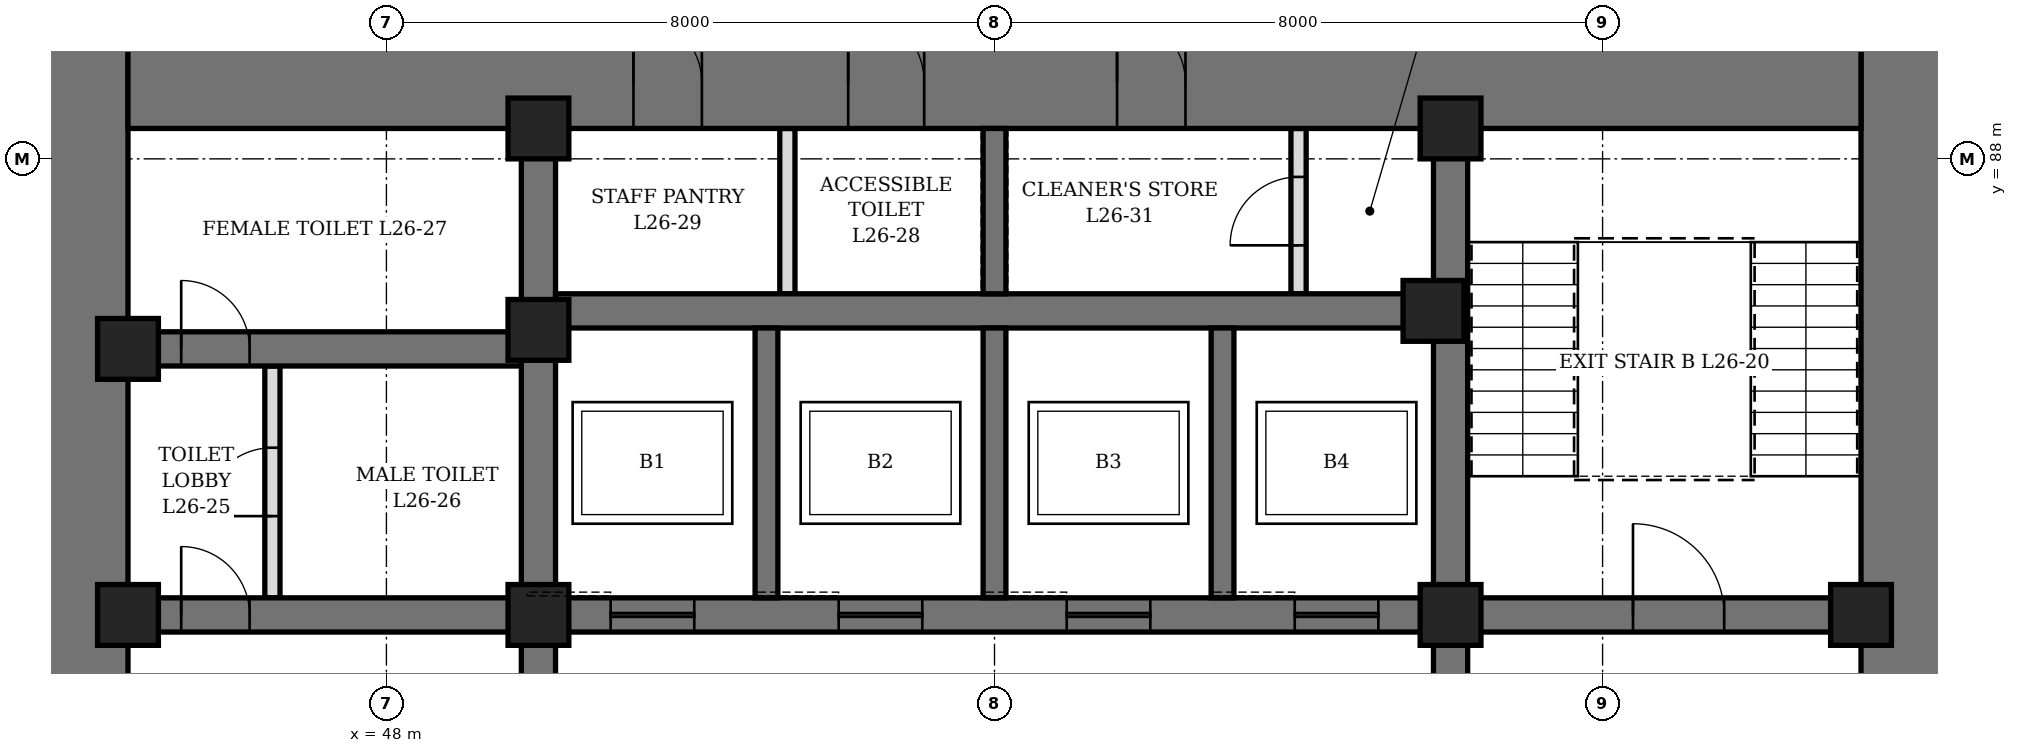
"""IFC4 building model, lengths in metres.
Left out: names, types, materials, properties, quantities, classifications, styles, units other than length and angle.
Written with IfcOpenShell. Run it as: python <this file> out.ifc"""

import sys

from ifc_helpers import new_model, si_unit, direction, frame, frame_2d, origin, origin_2d, place, context, subcontext, project, spatial, rectangle, hollow_rectangle, extrude, element, fill, save


model = new_model("IFC4")
c1 = context("Model", 3, precision=1e-05, world=origin(), true_north=direction((0.0, 1.0)))
c2 = subcontext(c1, "Body", "Model", "MODEL_VIEW")
j1 = project(units=[si_unit("LENGTHUNIT", "METRE"), si_unit("PLANEANGLEUNIT", "RADIAN")], contexts=[c1])
p1 = place(None, origin())
s1 = spatial("IfcSite", under=j1, at=p1, CompositionType="ELEMENT")
p2 = place(p1, origin())
s2 = spatial("IfcBuilding", under=s1, at=p2, CompositionType="ELEMENT")
p3 = place(p2, frame((0.0, 0.0, 120.7)))
s3 = spatial("IfcBuildingStorey", under=s2, at=p3, CompositionType="ELEMENT", Elevation=120.7)
p4 = place(p3, frame((44.0, 70.4, 0.0), z_axis=(0.0, 0.0, 1.0), x_axis=(0.0, 1.0, 0.0)))
e1 = element("IfcWall", 1, at=p4, inside=s3, PredefinedType="SHEAR", context=c2, shape_type="SweptSolid", body=[
    extrude(rectangle(XDim=19.2, YDim=1.2, at=frame_2d((9.6, 0.0))), origin(), (0.0, 0.0, 1.0), 4.2),
])
p5 = place(p4, frame((8.6, 0.0, 0.0)))
e2 = element("IfcOpeningElement", 2, at=p5, cuts=e1, PredefinedType="OPENING", context=c2, shape_type="SweptSolid", body=[
    extrude(rectangle(XDim=2.0, YDim=2.4, at=frame_2d((1.0, 1.2))), frame((0.0, 0.61, 0.0), z_axis=(0.0, -1.0, 0.0), x_axis=(1.0, 0.0, 0.0)), (0.0, 0.0, 1.0), 1.22),
])
p6 = place(p3, frame((68.0, 70.4, 0.0), z_axis=(0.0, 0.0, 1.0), x_axis=(0.0, 1.0, 0.0)))
e3 = element("IfcWall", 3, at=p6, inside=s3, PredefinedType="SHEAR", context=c2, shape_type="SweptSolid", body=[
    extrude(rectangle(XDim=19.2, YDim=1.2, at=frame_2d((9.6, 0.0))), origin(), (0.0, 0.0, 1.0), 4.2),
])
p7 = place(p6, frame((8.6, 0.0, 0.0)))
e4 = element("IfcOpeningElement", 4, at=p7, cuts=e3, PredefinedType="OPENING", context=c2, shape_type="SweptSolid", body=[
    extrude(rectangle(XDim=2.0, YDim=2.4, at=frame_2d((1.0, 1.2))), frame((0.0, 0.61, 0.0), z_axis=(0.0, -1.0, 0.0), x_axis=(1.0, 0.0, 0.0)), (0.0, 0.0, 1.0), 1.22),
])
p8 = place(p3, frame((44.6, 89.0, 0.0), z_axis=(0.0, 0.0, 1.0), x_axis=(1.0, 0.0, 0.0)))
e5 = element("IfcWall", 5, at=p8, inside=s3, PredefinedType="SHEAR", context=c2, shape_type="SweptSolid", body=[
    extrude(rectangle(XDim=22.8, YDim=1.2, at=frame_2d((11.4, 0.0))), origin(), (0.0, 0.0, 1.0), 4.2),
])
p9 = place(p8, frame((9.475, 0.0, 0.0)))
e6 = element("IfcOpeningElement", 6, at=p9, cuts=e5, PredefinedType="OPENING", context=c2, shape_type="SweptSolid", body=[
    extrude(rectangle(XDim=1.0, YDim=2.1, at=frame_2d((0.5, 1.05))), frame((0.0, 0.61, 0.0), z_axis=(0.0, -1.0, 0.0), x_axis=(1.0, 0.0, 0.0)), (0.0, 0.0, 1.0), 1.22),
])
p10 = place(p8, frame((6.65, 0.0, 0.0)))
e7 = element("IfcOpeningElement", 7, at=p10, cuts=e5, PredefinedType="OPENING", context=c2, shape_type="SweptSolid", body=[
    extrude(rectangle(XDim=0.9, YDim=2.1, at=frame_2d((0.45, 1.05))), frame((0.0, 0.61, 0.0), z_axis=(0.0, -1.0, 0.0), x_axis=(1.0, 0.0, 0.0)), (0.0, 0.0, 1.0), 1.22),
])
p11 = place(p8, frame((13.012, 0.0, 0.0)))
e8 = element("IfcOpeningElement", 8, at=p11, cuts=e5, PredefinedType="OPENING", context=c2, shape_type="SweptSolid", body=[
    extrude(rectangle(XDim=0.9, YDim=2.1, at=frame_2d((0.45, 1.05))), frame((0.0, 0.61, 0.0), z_axis=(0.0, -1.0, 0.0), x_axis=(1.0, 0.0, 0.0)), (0.0, 0.0, 1.0), 1.22),
])
p12 = place(p3, frame((50.0, 71.6, 0.0), z_axis=(0.0, 0.0, 1.0), x_axis=(0.0, 1.0, 0.0)))
e9 = element("IfcWall", 9, at=p12, inside=s3, PredefinedType="SHEAR", context=c2, shape_type="SweptSolid", body=[
    extrude(rectangle(XDim=16.8, YDim=0.45, at=frame_2d((8.4, 0.0))), origin(), (0.0, 0.0, 1.0), 4.2),
])
p13 = place(p12, frame((7.5, 0.0, 0.0)))
e10 = element("IfcOpeningElement", 10, at=p13, cuts=e9, PredefinedType="OPENING", context=c2, shape_type="SweptSolid", body=[
    extrude(rectangle(XDim=1.8, YDim=2.4, at=frame_2d((0.9, 1.2))), frame((0.0, 0.235, 0.0), z_axis=(0.0, -1.0, 0.0), x_axis=(1.0, 0.0, 0.0)), (0.0, 0.0, 1.0), 0.47),
])
p14 = place(p3, frame((62.0, 71.6, 0.0), z_axis=(0.0, 0.0, 1.0), x_axis=(0.0, 1.0, 0.0)))
e11 = element("IfcWall", 11, at=p14, inside=s3, PredefinedType="SHEAR", context=c2, shape_type="SweptSolid", body=[
    extrude(rectangle(XDim=16.8, YDim=0.45, at=frame_2d((8.4, 0.0))), origin(), (0.0, 0.0, 1.0), 4.2),
])
p15 = place(p14, frame((7.5, 0.0, 0.0)))
e12 = element("IfcOpeningElement", 12, at=p15, cuts=e11, PredefinedType="OPENING", context=c2, shape_type="SweptSolid", body=[
    extrude(rectangle(XDim=1.8, YDim=2.4, at=frame_2d((0.9, 1.2))), frame((0.0, 0.235, 0.0), z_axis=(0.0, -1.0, 0.0), x_axis=(1.0, 0.0, 0.0)), (0.0, 0.0, 1.0), 0.47),
])
p16 = place(p3, frame((44.6, 82.0, 0.0), z_axis=(0.0, 0.0, 1.0), x_axis=(1.0, 0.0, 0.0)))
e13 = element("IfcWall", 13, at=p16, inside=s3, PredefinedType="SHEAR", context=c2, shape_type="SweptSolid", body=[
    extrude(rectangle(XDim=5.175, YDim=0.45, at=frame_2d((2.587, 0.0))), origin(), (0.0, 0.0, 1.0), 4.2),
])
p17 = place(p16, frame((0.7, 0.0, 0.0)))
e14 = element("IfcOpeningElement", 14, at=p17, cuts=e13, PredefinedType="OPENING", context=c2, shape_type="SweptSolid", body=[
    extrude(rectangle(XDim=0.9, YDim=2.1, at=frame_2d((0.45, 1.05))), frame((0.0, 0.235, 0.0), z_axis=(0.0, -1.0, 0.0), x_axis=(1.0, 0.0, 0.0)), (0.0, 0.0, 1.0), 0.47),
])
p18 = place(p3, frame((44.6, 85.5, 0.0), z_axis=(0.0, 0.0, 1.0), x_axis=(1.0, 0.0, 0.0)))
e15 = element("IfcWall", 15, at=p18, inside=s3, PredefinedType="SHEAR", context=c2, shape_type="SweptSolid", body=[
    extrude(rectangle(XDim=5.175, YDim=0.45, at=frame_2d((2.587, 0.0))), origin(), (0.0, 0.0, 1.0), 4.2),
])
p19 = place(p18, frame((0.7, 0.0, 0.0)))
e16 = element("IfcOpeningElement", 16, at=p19, cuts=e15, PredefinedType="OPENING", context=c2, shape_type="SweptSolid", body=[
    extrude(rectangle(XDim=0.9, YDim=2.1, at=frame_2d((0.45, 1.05))), frame((0.0, 0.235, 0.0), z_axis=(0.0, -1.0, 0.0), x_axis=(1.0, 0.0, 0.0)), (0.0, 0.0, 1.0), 0.47),
])
p20 = place(p3, frame((62.225, 82.0, 0.0), z_axis=(0.0, 0.0, 1.0), x_axis=(1.0, 0.0, 0.0)))
e17 = element("IfcWall", 17, at=p20, inside=s3, PredefinedType="SHEAR", context=c2, shape_type="SweptSolid", body=[
    extrude(rectangle(XDim=5.175, YDim=0.45, at=frame_2d((2.587, 0.0))), origin(), (0.0, 0.0, 1.0), 4.2),
])
p21 = place(p20, frame((2.175, 0.0, 0.0)))
e18 = element("IfcOpeningElement", 18, at=p21, cuts=e17, PredefinedType="OPENING", context=c2, shape_type="SweptSolid", body=[
    extrude(rectangle(XDim=1.2, YDim=2.1, at=frame_2d((0.6, 1.05))), frame((0.0, 0.235, 0.0), z_axis=(0.0, -1.0, 0.0), x_axis=(1.0, 0.0, 0.0)), (0.0, 0.0, 1.0), 0.47),
])
p22 = place(p3, frame((50.225, 82.0, 0.0), z_axis=(0.0, 0.0, 1.0), x_axis=(1.0, 0.0, 0.0)))
e19 = element("IfcWall", 19, at=p22, inside=s3, PredefinedType="SHEAR", context=c2, shape_type="SweptSolid", body=[
    extrude(rectangle(XDim=11.55, YDim=0.45, at=frame_2d((5.775, 0.0))), origin(), (0.0, 0.0, 1.0), 4.2),
])
p23 = place(p22, frame((0.725, 0.0, 0.0)))
e20 = element("IfcOpeningElement", 20, at=p23, cuts=e19, PredefinedType="OPENING", context=c2, shape_type="SweptSolid", body=[
    extrude(rectangle(XDim=1.1, YDim=2.2, at=frame_2d((0.55, 1.1))), frame((0.0, 0.235, 0.0), z_axis=(0.0, -1.0, 0.0), x_axis=(1.0, 0.0, 0.0)), (0.0, 0.0, 1.0), 0.47),
])
p24 = place(p22, frame((3.725, 0.0, 0.0)))
e21 = element("IfcOpeningElement", 21, at=p24, cuts=e19, PredefinedType="OPENING", context=c2, shape_type="SweptSolid", body=[
    extrude(rectangle(XDim=1.1, YDim=2.2, at=frame_2d((0.55, 1.1))), frame((0.0, 0.235, 0.0), z_axis=(0.0, -1.0, 0.0), x_axis=(1.0, 0.0, 0.0)), (0.0, 0.0, 1.0), 0.47),
])
p25 = place(p22, frame((6.725, 0.0, 0.0)))
e22 = element("IfcOpeningElement", 22, at=p25, cuts=e19, PredefinedType="OPENING", context=c2, shape_type="SweptSolid", body=[
    extrude(rectangle(XDim=1.1, YDim=2.2, at=frame_2d((0.55, 1.1))), frame((0.0, 0.235, 0.0), z_axis=(0.0, -1.0, 0.0), x_axis=(1.0, 0.0, 0.0)), (0.0, 0.0, 1.0), 0.47),
])
p26 = place(p22, frame((9.725, 0.0, 0.0)))
e23 = element("IfcOpeningElement", 23, at=p26, cuts=e19, PredefinedType="OPENING", context=c2, shape_type="SweptSolid", body=[
    extrude(rectangle(XDim=1.1, YDim=2.2, at=frame_2d((0.55, 1.1))), frame((0.0, 0.235, 0.0), z_axis=(0.0, -1.0, 0.0), x_axis=(1.0, 0.0, 0.0)), (0.0, 0.0, 1.0), 0.47),
])
p27 = place(p3, frame((50.225, 86.0, 0.0), z_axis=(0.0, 0.0, 1.0), x_axis=(1.0, 0.0, 0.0)))
e24 = element("IfcWall", 24, at=p27, inside=s3, PredefinedType="SHEAR", context=c2, shape_type="SweptSolid", body=[
    extrude(rectangle(XDim=11.55, YDim=0.45, at=frame_2d((5.775, 0.0))), origin(), (0.0, 0.0, 1.0), 4.2),
])
for number, where, z_axis, x_axis in (
    (25, (53.0, 82.225, 0.0), (0.0, 0.0, 1.0), (0.0, 1.0, 0.0)),
    (26, (56.0, 82.225, 0.0), (0.0, 0.0, 1.0), (0.0, 1.0, 0.0)),
    (27, (59.0, 82.225, 0.0), (0.0, 0.0, 1.0), (0.0, 1.0, 0.0)),
):
    element("IfcWall", number, at=place(p3, frame(where, z_axis=z_axis, x_axis=x_axis)), inside=s3, PredefinedType="SHEAR", context=c2, shape_type="SweptSolid", body=[
        extrude(rectangle(XDim=3.55, YDim=0.3, at=frame_2d((1.775, 0.0))), origin(), (0.0, 0.0, 1.0), 4.2),
    ])
p28 = place(p3, frame((56.0, 86.225, 0.0), z_axis=(0.0, 0.0, 1.0), x_axis=(0.0, 1.0, 0.0)))
e28 = element("IfcWall", 28, at=p28, inside=s3, PredefinedType="SHEAR", context=c2, shape_type="SweptSolid", body=[
    extrude(rectangle(XDim=2.175, YDim=0.3, at=frame_2d((1.087, 0.0))), origin(), (0.0, 0.0, 1.0), 4.2),
])
for number, where, z_axis, x_axis in (
    (29, (44.6, 82.0, 0.0), (0.0, 0.0, 1.0), (1.0, 0.0, 0.0)),
    (30, (44.6, 85.5, 0.0), (0.0, 0.0, 1.0), (1.0, 0.0, 0.0)),
    (31, (50.0, 82.0, 0.0), (0.0, 0.0, 1.0), (1.0, 0.0, 0.0)),
    (32, (50.0, 85.75, 0.0), (0.0, 0.0, 1.0), (1.0, 0.0, 0.0)),
    (33, (50.0, 88.4, 0.0), (0.0, 0.0, 1.0), (1.0, 0.0, 0.0)),
    (34, (61.775, 86.0, 0.0), (0.0, 0.0, 1.0), (1.0, 0.0, 0.0)),
    (35, (62.0, 82.0, 0.0), (0.0, 0.0, 1.0), (1.0, 0.0, 0.0)),
    (36, (62.0, 88.4, 0.0), (0.0, 0.0, 1.0), (1.0, 0.0, 0.0)),
    (37, (67.4, 82.0, 0.0), (0.0, 0.0, 1.0), (1.0, 0.0, 0.0)),
):
    element("IfcColumn", number, at=place(p3, frame(where, z_axis=z_axis, x_axis=x_axis)), inside=s3, PredefinedType="COLUMN", context=c2, shape_type="SweptSolid", body=[
        extrude(hollow_rectangle(XDim=0.8, YDim=0.8, WallThickness=0.1, at=origin_2d()), origin(), (0.0, 0.0, 1.0), 4.2),
    ])
p29 = place(p3, frame((46.5, 82.225, 0.0), z_axis=(0.0, 0.0, 1.0), x_axis=(0.0, 1.0, 0.0)))
e38 = element("IfcWall", 38, at=p29, inside=s3, PredefinedType="PARTITIONING", context=c2, shape_type="SweptSolid", body=[
    extrude(rectangle(XDim=3.05, YDim=0.2, at=frame_2d((1.525, 0.0))), origin(), (0.0, 0.0, 1.0), 4.04),
])
p30 = place(p29, frame((1.075, 0.0, 0.0)))
e39 = element("IfcOpeningElement", 39, at=p30, cuts=e38, PredefinedType="OPENING", context=c2, shape_type="SweptSolid", body=[
    extrude(rectangle(XDim=0.9, YDim=2.1, at=frame_2d((0.45, 1.05))), frame((0.0, 0.11, 0.0), z_axis=(0.0, -1.0, 0.0), x_axis=(1.0, 0.0, 0.0)), (0.0, 0.0, 1.0), 0.22),
])
p31 = place(p3, frame((53.275, 86.225, 0.0), z_axis=(0.0, 0.0, 1.0), x_axis=(0.0, 1.0, 0.0)))
e40 = element("IfcWall", 40, at=p31, inside=s3, PredefinedType="PARTITIONING", context=c2, shape_type="SweptSolid", body=[
    extrude(rectangle(XDim=2.175, YDim=0.2, at=frame_2d((1.087, 0.0))), origin(), (0.0, 0.0, 1.0), 4.04),
])
p32 = place(p3, frame((60.0, 86.225, 0.0), z_axis=(0.0, 0.0, 1.0), x_axis=(0.0, 1.0, 0.0)))
e41 = element("IfcWall", 41, at=p32, inside=s3, PredefinedType="PARTITIONING", context=c2, shape_type="SweptSolid", body=[
    extrude(rectangle(XDim=2.175, YDim=0.2, at=frame_2d((1.087, 0.0))), origin(), (0.0, 0.0, 1.0), 4.04),
])
p33 = place(p32, frame((0.637, 0.0, 0.0)))
e42 = element("IfcOpeningElement", 42, at=p33, cuts=e41, PredefinedType="OPENING", context=c2, shape_type="SweptSolid", body=[
    extrude(rectangle(XDim=0.9, YDim=2.1, at=frame_2d((0.45, 1.05))), frame((0.0, 0.11, 0.0), z_axis=(0.0, -1.0, 0.0), x_axis=(1.0, 0.0, 0.0)), (0.0, 0.0, 1.0), 0.22),
])
p34 = place(p17, origin())
e43 = element("IfcDoor", 43, at=p34, inside=s3, OperationType="SINGLE_SWING_LEFT", PredefinedType="DOOR", context=c2, shape_type="SweptSolid", body=[
    extrude(rectangle(XDim=0.9, YDim=2.1, at=frame_2d((0.45, 1.05))), frame((0.0, 0.225, 0.0), z_axis=(0.0, -1.0, 0.0), x_axis=(1.0, 0.0, 0.0)), (0.0, 0.0, 1.0), 0.449),
])
fill(e14, e43)
p35 = place(p30, origin())
e44 = element("IfcDoor", 44, at=p35, inside=s3, OperationType="SINGLE_SWING_RIGHT", PredefinedType="DOOR", context=c2, shape_type="SweptSolid", body=[
    extrude(rectangle(XDim=0.9, YDim=2.1, at=frame_2d((0.45, 1.05))), frame((0.0, 0.1, 0.0), z_axis=(0.0, -1.0, 0.0), x_axis=(1.0, 0.0, 0.0)), (0.0, 0.0, 1.0), 0.199),
])
fill(e39, e44)
p36 = place(p19, origin())
e45 = element("IfcDoor", 45, at=p36, inside=s3, OperationType="SINGLE_SWING_RIGHT", PredefinedType="DOOR", context=c2, shape_type="SweptSolid", body=[
    extrude(rectangle(XDim=0.9, YDim=2.1, at=frame_2d((0.45, 1.05))), frame((0.0, 0.225, 0.0), z_axis=(0.0, -1.0, 0.0), x_axis=(1.0, 0.0, 0.0)), (0.0, 0.0, 1.0), 0.449),
])
fill(e16, e45)
p37 = place(p9, origin())
e46 = element("IfcDoor", 46, at=p37, inside=s3, OperationType="SINGLE_SWING_LEFT", PredefinedType="DOOR", context=c2, shape_type="SweptSolid", body=[
    extrude(rectangle(XDim=1.0, YDim=2.1, at=frame_2d((0.5, 1.05))), frame((0.0, 0.35, 0.0), z_axis=(0.0, -1.0, 0.0), x_axis=(1.0, 0.0, 0.0)), (0.0, 0.0, 1.0), 0.7),
])
fill(e6, e46)
p38 = place(p10, origin())
e47 = element("IfcDoor", 47, at=p38, inside=s3, OperationType="SINGLE_SWING_LEFT", PredefinedType="DOOR", context=c2, shape_type="SweptSolid", body=[
    extrude(rectangle(XDim=0.9, YDim=2.1, at=frame_2d((0.45, 1.05))), frame((0.0, 0.35, 0.0), z_axis=(0.0, -1.0, 0.0), x_axis=(1.0, 0.0, 0.0)), (0.0, 0.0, 1.0), 0.7),
])
fill(e7, e47)
p39 = place(p11, origin())
e48 = element("IfcDoor", 48, at=p39, inside=s3, OperationType="SINGLE_SWING_LEFT", PredefinedType="DOOR", context=c2, shape_type="SweptSolid", body=[
    extrude(rectangle(XDim=0.9, YDim=2.1, at=frame_2d((0.45, 1.05))), frame((0.0, 0.35, 0.0), z_axis=(0.0, -1.0, 0.0), x_axis=(1.0, 0.0, 0.0)), (0.0, 0.0, 1.0), 0.7),
])
fill(e8, e48)
p40 = place(p33, origin())
e49 = element("IfcDoor", 49, at=p40, inside=s3, OperationType="SINGLE_SWING_LEFT", PredefinedType="DOOR", context=c2, shape_type="SweptSolid", body=[
    extrude(rectangle(XDim=0.9, YDim=2.1, at=frame_2d((0.45, 1.05))), frame((0.0, 0.1, 0.0), z_axis=(0.0, -1.0, 0.0), x_axis=(1.0, 0.0, 0.0)), (0.0, 0.0, 1.0), 0.199),
])
fill(e42, e49)
p41 = place(p21, origin())
e50 = element("IfcDoor", 50, at=p41, inside=s3, OperationType="SINGLE_SWING_LEFT", PredefinedType="DOOR", context=c2, shape_type="SweptSolid", body=[
    extrude(rectangle(XDim=1.2, YDim=2.1, at=frame_2d((0.6, 1.05))), frame((0.0, 0.225, 0.0), z_axis=(0.0, -1.0, 0.0), x_axis=(1.0, 0.0, 0.0)), (0.0, 0.0, 1.0), 0.449),
])
fill(e18, e50)
p42 = place(p23, origin())
e51 = element("IfcDoor", 51, at=p42, inside=s3, OperationType="SLIDING_TO_LEFT", PredefinedType="DOOR", context=c2, shape_type="SweptSolid", body=[
    extrude(rectangle(XDim=1.1, YDim=2.2, at=frame_2d((0.55, 1.1))), frame((0.0, 0.225, 0.0), z_axis=(0.0, -1.0, 0.0), x_axis=(1.0, 0.0, 0.0)), (0.0, 0.0, 1.0), 0.449),
])
fill(e20, e51)
p43 = place(p24, origin())
e52 = element("IfcDoor", 52, at=p43, inside=s3, OperationType="SLIDING_TO_LEFT", PredefinedType="DOOR", context=c2, shape_type="SweptSolid", body=[
    extrude(rectangle(XDim=1.1, YDim=2.2, at=frame_2d((0.55, 1.1))), frame((0.0, 0.225, 0.0), z_axis=(0.0, -1.0, 0.0), x_axis=(1.0, 0.0, 0.0)), (0.0, 0.0, 1.0), 0.449),
])
fill(e21, e52)
p44 = place(p25, origin())
e53 = element("IfcDoor", 53, at=p44, inside=s3, OperationType="SLIDING_TO_LEFT", PredefinedType="DOOR", context=c2, shape_type="SweptSolid", body=[
    extrude(rectangle(XDim=1.1, YDim=2.2, at=frame_2d((0.55, 1.1))), frame((0.0, 0.225, 0.0), z_axis=(0.0, -1.0, 0.0), x_axis=(1.0, 0.0, 0.0)), (0.0, 0.0, 1.0), 0.449),
])
fill(e22, e53)
p45 = place(p26, origin())
e54 = element("IfcDoor", 54, at=p45, inside=s3, OperationType="SLIDING_TO_LEFT", PredefinedType="DOOR", context=c2, shape_type="SweptSolid", body=[
    extrude(rectangle(XDim=1.1, YDim=2.2, at=frame_2d((0.55, 1.1))), frame((0.0, 0.225, 0.0), z_axis=(0.0, -1.0, 0.0), x_axis=(1.0, 0.0, 0.0)), (0.0, 0.0, 1.0), 0.449),
])
fill(e23, e54)
save(model, sys.argv[1])
